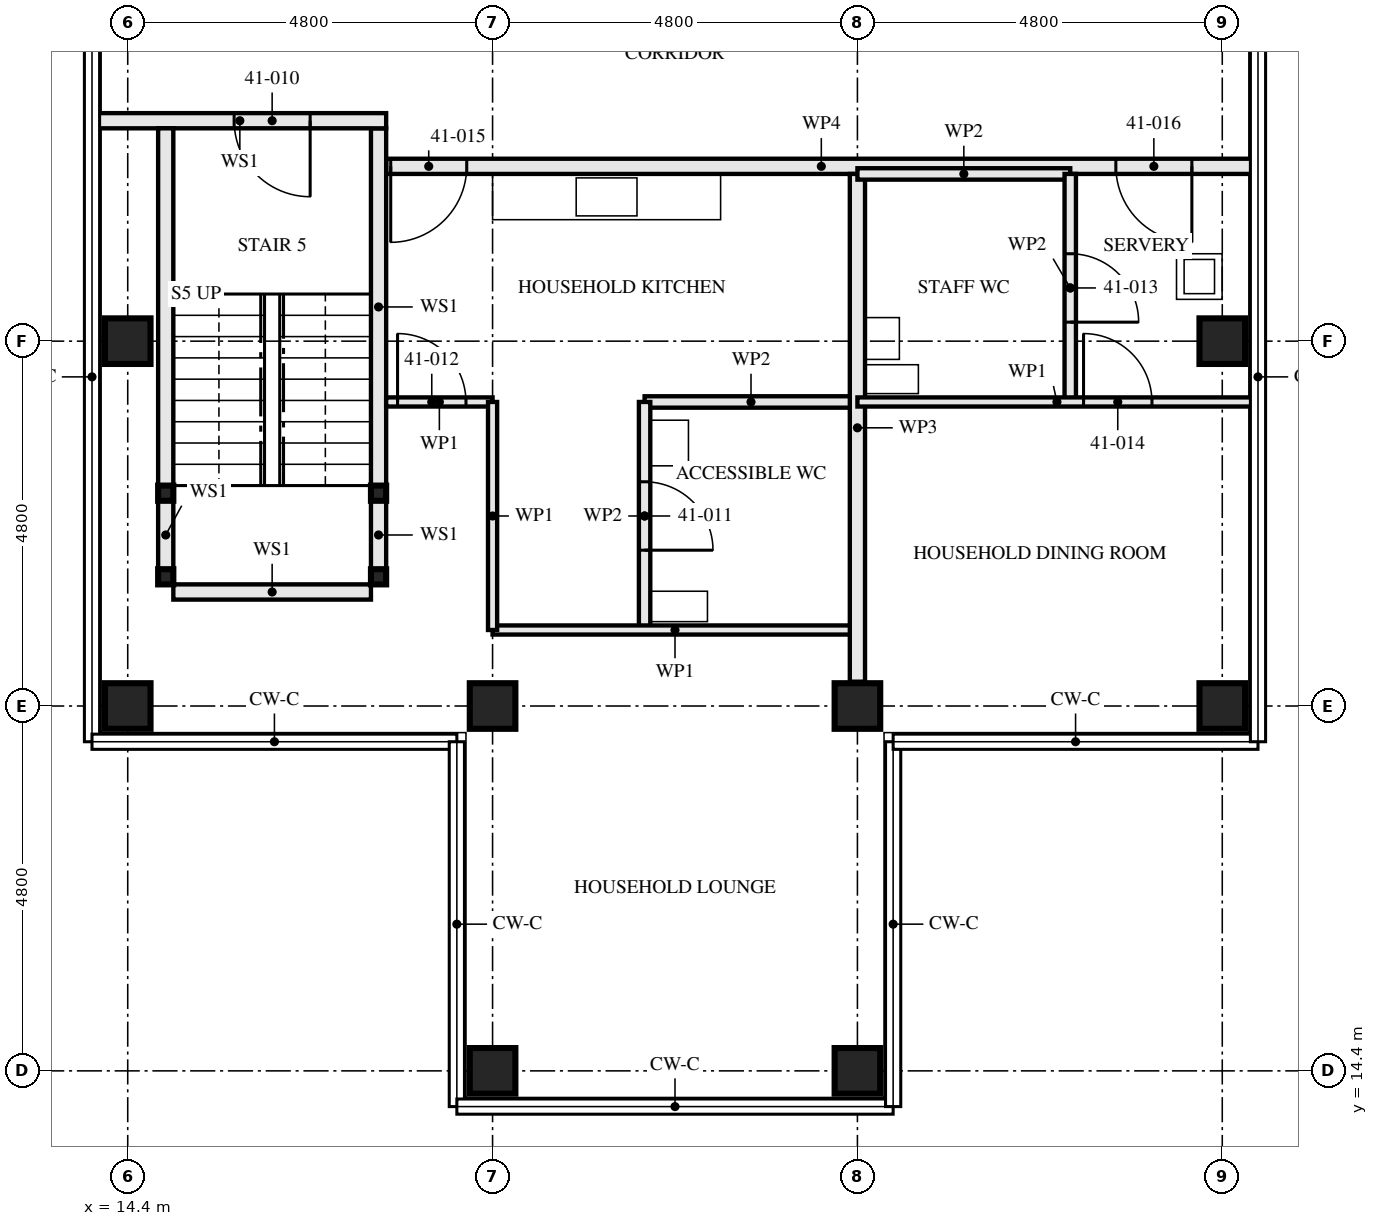
"""IFC4 building model, lengths in metres.
Left out: names, types, materials, properties, quantities, classifications, styles, units other than length and angle.
Written with IfcOpenShell. Run it as: python <this file> out.ifc"""

import sys

from ifc_helpers import new_model, si_unit, direction, frame, frame_2d, origin, origin_2d, place, context, subcontext, project, spatial, rectangle, hollow_rectangle, extrude, element, fill, save


model = new_model("IFC4")
c1 = context("Model", 3, precision=1e-05, world=origin(), true_north=direction((0.0, 1.0)))
c2 = subcontext(c1, "Body", "Model", "MODEL_VIEW")
j1 = project(units=[si_unit("LENGTHUNIT", "METRE"), si_unit("PLANEANGLEUNIT", "RADIAN")], contexts=[c1])
p1 = place(None, origin())
s1 = spatial("IfcSite", under=j1, at=p1, CompositionType="ELEMENT")
p2 = place(p1, origin())
s2 = spatial("IfcBuilding", under=s1, at=p2, CompositionType="ELEMENT")
p3 = place(p2, frame((0.0, 0.0, 151.5)))
s3 = spatial("IfcBuildingStorey", under=s2, at=p3, CompositionType="ELEMENT", Elevation=151.5)
p4 = place(p3, frame((14.4, 19.2, 0.0), z_axis=(0.0, 0.0, 1.0), x_axis=(0.0, 1.0, 0.0)))
e1 = element("IfcColumn", 1, at=p4, inside=s3, PredefinedType="COLUMN", context=c2, shape_type="SweptSolid", body=[
    extrude(hollow_rectangle(XDim=0.6, YDim=0.6, WallThickness=0.06, at=origin_2d()), origin(), (0.0, 0.0, 1.0), 3.5),
])
p5 = place(p3, frame((14.4, 24.0, 0.0), z_axis=(0.0, 0.0, 1.0), x_axis=(1.0, 0.0, 0.0)))
e2 = element("IfcColumn", 2, at=p5, inside=s3, PredefinedType="COLUMN", context=c2, shape_type="SweptSolid", body=[
    extrude(hollow_rectangle(XDim=0.6, YDim=0.6, WallThickness=0.08, at=origin_2d()), origin(), (0.0, 0.0, 1.0), 3.5),
])
for number, where, z_axis, x_axis in (
    (3, (19.2, 14.4, 0.0), (0.0, 0.0, 1.0), (0.0, 1.0, 0.0)),
    (4, (19.2, 19.2, 0.0), (0.0, 0.0, 1.0), (0.0, 1.0, 0.0)),
    (5, (24.0, 14.4, 0.0), (0.0, 0.0, 1.0), (0.0, 1.0, 0.0)),
    (6, (24.0, 19.2, 0.0), (0.0, 0.0, 1.0), (0.0, 1.0, 0.0)),
    (7, (28.8, 19.2, 0.0), (0.0, 0.0, 1.0), (0.0, 1.0, 0.0)),
):
    element("IfcColumn", number, at=place(p3, frame(where, z_axis=z_axis, x_axis=x_axis)), inside=s3, PredefinedType="COLUMN", context=c2, shape_type="SweptSolid", body=[
        extrude(hollow_rectangle(XDim=0.6, YDim=0.6, WallThickness=0.06, at=origin_2d()), origin(), (0.0, 0.0, 1.0), 3.5),
    ])
p6 = place(p3, frame((28.8, 24.0, 0.0), z_axis=(0.0, 0.0, 1.0), x_axis=(1.0, 0.0, 0.0)))
e8 = element("IfcColumn", 8, at=p6, inside=s3, PredefinedType="COLUMN", context=c2, shape_type="SweptSolid", body=[
    extrude(hollow_rectangle(XDim=0.6, YDim=0.6, WallThickness=0.08, at=origin_2d()), origin(), (0.0, 0.0, 1.0), 3.5),
])
for number, where, z_axis, x_axis in (
    (9, (14.9, 20.9, 0.0), (0.0, 0.0, 1.0), (1.0, 0.0, 0.0)),
    (10, (17.7, 20.9, 0.0), (0.0, 0.0, 1.0), (1.0, 0.0, 0.0)),
    (11, (14.9, 22.0, 0.0), (0.0, 0.0, 1.0), (1.0, 0.0, 0.0)),
    (12, (17.7, 22.0, 0.0), (0.0, 0.0, 1.0), (1.0, 0.0, 0.0)),
):
    element("IfcColumn", number, at=place(p3, frame(where, z_axis=z_axis, x_axis=x_axis)), inside=s3, PredefinedType="COLUMN", context=c2, shape_type="SweptSolid", body=[
        extrude(hollow_rectangle(XDim=0.2, YDim=0.2, WallThickness=0.008, at=origin_2d()), origin(), (0.0, 0.0, 1.0), 3.33),
    ])
p7 = place(p3, frame((14.9, 21.0, 0.0), z_axis=(0.0, 0.0, 1.0), x_axis=(0.0, 1.0, 0.0)))
e13 = element("IfcWall", 13, at=p7, inside=s3, PredefinedType="SOLIDWALL", context=c2, shape_type="SweptSolid", body=[
    extrude(rectangle(XDim=0.9, YDim=0.2, at=frame_2d((0.45, 0.0))), origin(), (0.0, 0.0, 1.0), 2.99),
])
p8 = place(p3, frame((14.9, 22.1, 0.0), z_axis=(0.0, 0.0, 1.0), x_axis=(0.0, 1.0, 0.0)))
e14 = element("IfcWall", 14, at=p8, inside=s3, PredefinedType="SOLIDWALL", context=c2, shape_type="SweptSolid", body=[
    extrude(rectangle(XDim=4.7, YDim=0.2, at=frame_2d((2.35, 0.0))), origin(), (0.0, 0.0, 1.0), 2.99),
])
p9 = place(p3, frame((17.7, 21.0, 0.0), z_axis=(0.0, 0.0, 1.0), x_axis=(0.0, 1.0, 0.0)))
e15 = element("IfcWall", 15, at=p9, inside=s3, PredefinedType="SOLIDWALL", context=c2, shape_type="SweptSolid", body=[
    extrude(rectangle(XDim=0.9, YDim=0.2, at=frame_2d((0.45, 0.0))), origin(), (0.0, 0.0, 1.0), 2.99),
])
p10 = place(p3, frame((17.7, 22.1, 0.0), z_axis=(0.0, 0.0, 1.0), x_axis=(0.0, 1.0, 0.0)))
e16 = element("IfcWall", 16, at=p10, inside=s3, PredefinedType="SOLIDWALL", context=c2, shape_type="SweptSolid", body=[
    extrude(rectangle(XDim=4.7, YDim=0.2, at=frame_2d((2.35, 0.0))), origin(), (0.0, 0.0, 1.0), 2.99),
])
p11 = place(p3, frame((15.0, 20.7, 0.0), z_axis=(0.0, 0.0, 1.0), x_axis=(1.0, 0.0, 0.0)))
e17 = element("IfcWall", 17, at=p11, inside=s3, PredefinedType="SOLIDWALL", context=c2, shape_type="SweptSolid", body=[
    extrude(rectangle(XDim=2.6, YDim=0.2, at=frame_2d((1.3, 0.0))), origin(), (0.0, 0.0, 1.0), 3.33),
])
p12 = place(p3, frame((13.95, 26.9, 0.0), z_axis=(0.0, 0.0, 1.0), x_axis=(1.0, 0.0, 0.0)))
e18 = element("IfcWall", 18, at=p12, inside=s3, PredefinedType="SOLIDWALL", context=c2, shape_type="SweptSolid", body=[
    extrude(rectangle(XDim=3.85, YDim=0.2, at=frame_2d((1.925, 0.0))), origin(), (0.0, 0.0, 1.0), 2.32),
])
p13 = place(p12, frame((1.85, 0.0, 0.0)))
e19 = element("IfcOpeningElement", 19, at=p13, cuts=e18, PredefinedType="OPENING", context=c2, shape_type="SweptSolid", body=[
    extrude(rectangle(XDim=1.0, YDim=2.1, at=frame_2d((0.5, 1.05))), frame((0.0, 0.111, 0.0), z_axis=(0.0, -1.0, 0.0), x_axis=(1.0, 0.0, 0.0)), (0.0, 0.0, 1.0), 0.221),
])
p14 = place(p3, frame((21.2, 20.2, 0.0), z_axis=(0.0, 0.0, 1.0), x_axis=(0.0, 1.0, 0.0)))
e20 = element("IfcWall", 20, at=p14, inside=s3, PredefinedType="PARTITIONING", context=c2, shape_type="SweptSolid", body=[
    extrude(rectangle(XDim=3.0, YDim=0.15, at=frame_2d((1.5, 0.0))), origin(), (0.0, 0.0, 1.0), 3.33),
])
p15 = place(p14, frame((1.05, 0.0, 0.0)))
e21 = element("IfcOpeningElement", 21, at=p15, cuts=e20, PredefinedType="OPENING", context=c2, shape_type="SweptSolid", body=[
    extrude(rectangle(XDim=0.9, YDim=2.1, at=frame_2d((0.45, 1.05))), frame((0.0, 0.085, 0.0), z_axis=(0.0, -1.0, 0.0), x_axis=(1.0, 0.0, 0.0)), (0.0, 0.0, 1.0), 0.171),
])
p16 = place(p3, frame((21.2, 23.2, 0.0), z_axis=(0.0, 0.0, 1.0), x_axis=(1.0, 0.0, 0.0)))
e22 = element("IfcWall", 22, at=p16, inside=s3, PredefinedType="PARTITIONING", context=c2, shape_type="SweptSolid", body=[
    extrude(rectangle(XDim=2.8, YDim=0.15, at=frame_2d((1.4, 0.0))), origin(), (0.0, 0.0, 1.0), 3.33),
])
p17 = place(p3, frame((17.8, 23.2, 0.0), z_axis=(0.0, 0.0, 1.0), x_axis=(1.0, 0.0, 0.0)))
e23 = element("IfcWall", 23, at=p17, inside=s3, PredefinedType="PARTITIONING", context=c2, shape_type="SweptSolid", body=[
    extrude(rectangle(XDim=1.4, YDim=0.12, at=frame_2d((0.7, 0.0))), origin(), (0.0, 0.0, 1.0), 3.33),
])
p18 = place(p17, frame((0.15, 0.0, 0.0)))
e24 = element("IfcOpeningElement", 24, at=p18, cuts=e23, PredefinedType="OPENING", context=c2, shape_type="SweptSolid", body=[
    extrude(rectangle(XDim=0.9, YDim=2.1, at=frame_2d((0.45, 1.05))), frame((0.0, 0.071, 0.0), z_axis=(0.0, -1.0, 0.0), x_axis=(1.0, 0.0, 0.0)), (0.0, 0.0, 1.0), 0.141),
])
p19 = place(p3, frame((19.2, 20.2, 0.0), z_axis=(0.0, 0.0, 1.0), x_axis=(1.0, 0.0, 0.0)))
e25 = element("IfcWall", 25, at=p19, inside=s3, PredefinedType="PARTITIONING", context=c2, shape_type="SweptSolid", body=[
    extrude(rectangle(XDim=4.8, YDim=0.12, at=frame_2d((2.4, 0.0))), origin(), (0.0, 0.0, 1.0), 3.33),
])
p20 = place(p3, frame((19.2, 20.2, 0.0), z_axis=(0.0, 0.0, 1.0), x_axis=(0.0, 1.0, 0.0)))
e26 = element("IfcWall", 26, at=p20, inside=s3, PredefinedType="PARTITIONING", context=c2, shape_type="SweptSolid", body=[
    extrude(rectangle(XDim=3.0, YDim=0.12, at=frame_2d((1.5, 0.0))), origin(), (0.0, 0.0, 1.0), 2.55),
])
p21 = place(p3, frame((24.0, 19.52, 0.0), z_axis=(0.0, 0.0, 1.0), x_axis=(0.0, 1.0, 0.0)))
e27 = element("IfcWall", 27, at=p21, inside=s3, PredefinedType="PARTITIONING", context=c2, shape_type="SweptSolid", body=[
    extrude(rectangle(XDim=6.68, YDim=0.2, at=frame_2d((3.34, 0.0))), origin(), (0.0, 0.0, 1.0), 2.55),
])
p22 = place(p3, frame((26.8, 23.2, 0.0), z_axis=(0.0, 0.0, 1.0), x_axis=(0.0, 1.0, 0.0)))
e28 = element("IfcWall", 28, at=p22, inside=s3, PredefinedType="PARTITIONING", context=c2, shape_type="SweptSolid", body=[
    extrude(rectangle(XDim=3.0, YDim=0.15, at=frame_2d((1.5, 0.0))), origin(), (0.0, 0.0, 1.0), 2.55),
])
p23 = place(p22, frame((1.05, 0.0, 0.0)))
e29 = element("IfcOpeningElement", 29, at=p23, cuts=e28, PredefinedType="OPENING", context=c2, shape_type="SweptSolid", body=[
    extrude(rectangle(XDim=0.9, YDim=2.1, at=frame_2d((0.45, 1.05))), frame((0.0, 0.085, 0.0), z_axis=(0.0, -1.0, 0.0), x_axis=(1.0, 0.0, 0.0)), (0.0, 0.0, 1.0), 0.171),
])
p24 = place(p3, frame((24.0, 26.2, 0.0), z_axis=(0.0, 0.0, 1.0), x_axis=(1.0, 0.0, 0.0)))
e30 = element("IfcWall", 30, at=p24, inside=s3, PredefinedType="PARTITIONING", context=c2, shape_type="SweptSolid", body=[
    extrude(rectangle(XDim=2.8, YDim=0.15, at=frame_2d((1.4, 0.0))), origin(), (0.0, 0.0, 1.0), 3.33),
])
p25 = place(p3, frame((24.0, 23.2, 0.0), z_axis=(0.0, 0.0, 1.0), x_axis=(1.0, 0.0, 0.0)))
e31 = element("IfcWall", 31, at=p25, inside=s3, PredefinedType="PARTITIONING", context=c2, shape_type="SweptSolid", body=[
    extrude(rectangle(XDim=5.25, YDim=0.12, at=frame_2d((2.625, 0.0))), origin(), (0.0, 0.0, 1.0), 2.32),
])
p26 = place(p25, frame((2.975, 0.0, 0.0)))
e32 = element("IfcOpeningElement", 32, at=p26, cuts=e31, PredefinedType="OPENING", context=c2, shape_type="SweptSolid", body=[
    extrude(rectangle(XDim=0.9, YDim=2.1, at=frame_2d((0.45, 1.05))), frame((0.0, 0.071, 0.0), z_axis=(0.0, -1.0, 0.0), x_axis=(1.0, 0.0, 0.0)), (0.0, 0.0, 1.0), 0.141),
])
p27 = place(p3, frame((17.8, 26.3, 0.0), z_axis=(0.0, 0.0, 1.0), x_axis=(1.0, 0.0, 0.0)))
e33 = element("IfcWall", 33, at=p27, inside=s3, PredefinedType="PARTITIONING", context=c2, shape_type="SweptSolid", body=[
    extrude(rectangle(XDim=11.45, YDim=0.2, at=frame_2d((5.725, 0.0))), origin(), (0.0, 0.0, 1.0), 2.32),
])
p28 = place(p27, frame((0.06, 0.0, 0.0)))
e34 = element("IfcOpeningElement", 34, at=p28, cuts=e33, PredefinedType="OPENING", context=c2, shape_type="SweptSolid", body=[
    extrude(rectangle(XDim=1.0, YDim=2.1, at=frame_2d((0.5, 1.05))), frame((0.0, 0.111, 0.0), z_axis=(0.0, -1.0, 0.0), x_axis=(1.0, 0.0, 0.0)), (0.0, 0.0, 1.0), 0.221),
])
p29 = place(p27, frame((9.6, 0.0, 0.0)))
e35 = element("IfcOpeningElement", 35, at=p29, cuts=e33, PredefinedType="OPENING", context=c2, shape_type="SweptSolid", body=[
    extrude(rectangle(XDim=1.0, YDim=2.1, at=frame_2d((0.5, 1.05))), frame((0.0, 0.111, 0.0), z_axis=(0.0, -1.0, 0.0), x_axis=(1.0, 0.0, 0.0)), (0.0, 0.0, 1.0), 0.221),
])
p30 = place(p13, frame((1.0, 0.0, 0.0), z_axis=(0.0, 0.0, 1.0), x_axis=(-1.0, 0.0, 0.0)))
e36 = element("IfcDoor", 36, at=p30, inside=s3, OperationType="SINGLE_SWING_RIGHT", PredefinedType="DOOR", context=c2, shape_type="SweptSolid", body=[
    extrude(rectangle(XDim=1.0, YDim=2.1, at=frame_2d((0.5, 1.05))), frame((0.0, 0.032, 0.0), z_axis=(0.0, -1.0, 0.0), x_axis=(1.0, 0.0, 0.0)), (0.0, 0.0, 1.0), 0.064),
])
fill(e19, e36)
p31 = place(p15, frame((0.9, 0.0, 0.0), z_axis=(0.0, 0.0, 1.0), x_axis=(-1.0, 0.0, 0.0)))
e37 = element("IfcDoor", 37, at=p31, inside=s3, OperationType="SINGLE_SWING_LEFT", PredefinedType="DOOR", context=c2, shape_type="SweptSolid", body=[
    extrude(rectangle(XDim=0.9, YDim=2.1, at=frame_2d((0.45, 1.05))), frame((0.0, 0.022, 0.0), z_axis=(0.0, -1.0, 0.0), x_axis=(1.0, 0.0, 0.0)), (0.0, 0.0, 1.0), 0.044),
])
fill(e21, e37)
p32 = place(p18, origin())
e38 = element("IfcDoor", 38, at=p32, inside=s3, OperationType="SINGLE_SWING_RIGHT", PredefinedType="DOOR", context=c2, shape_type="SweptSolid", body=[
    extrude(rectangle(XDim=0.9, YDim=2.1, at=frame_2d((0.45, 1.05))), frame((0.0, 0.022, 0.0), z_axis=(0.0, -1.0, 0.0), x_axis=(1.0, 0.0, 0.0)), (0.0, 0.0, 1.0), 0.044),
])
fill(e24, e38)
p33 = place(p23, frame((0.9, 0.0, 0.0), z_axis=(0.0, 0.0, 1.0), x_axis=(-1.0, 0.0, 0.0)))
e39 = element("IfcDoor", 39, at=p33, inside=s3, OperationType="SINGLE_SWING_LEFT", PredefinedType="DOOR", context=c2, shape_type="SweptSolid", body=[
    extrude(rectangle(XDim=0.9, YDim=2.1, at=frame_2d((0.45, 1.05))), frame((0.0, 0.022, 0.0), z_axis=(0.0, -1.0, 0.0), x_axis=(1.0, 0.0, 0.0)), (0.0, 0.0, 1.0), 0.044),
])
fill(e29, e39)
p34 = place(p26, origin())
e40 = element("IfcDoor", 40, at=p34, inside=s3, OperationType="SINGLE_SWING_RIGHT", PredefinedType="DOOR", context=c2, shape_type="SweptSolid", body=[
    extrude(rectangle(XDim=0.9, YDim=2.1, at=frame_2d((0.45, 1.05))), frame((0.0, 0.022, 0.0), z_axis=(0.0, -1.0, 0.0), x_axis=(1.0, 0.0, 0.0)), (0.0, 0.0, 1.0), 0.044),
])
fill(e32, e40)
p35 = place(p28, frame((1.0, 0.0, 0.0), z_axis=(0.0, 0.0, 1.0), x_axis=(-1.0, 0.0, 0.0)))
e41 = element("IfcDoor", 41, at=p35, inside=s3, OperationType="SINGLE_SWING_LEFT", PredefinedType="DOOR", context=c2, shape_type="SweptSolid", body=[
    extrude(rectangle(XDim=1.0, YDim=2.1, at=frame_2d((0.5, 1.05))), frame((0.0, 0.027, 0.0), z_axis=(0.0, -1.0, 0.0), x_axis=(1.0, 0.0, 0.0)), (0.0, 0.0, 1.0), 0.054),
])
fill(e34, e41)
p36 = place(p29, frame((1.0, 0.0, 0.0), z_axis=(0.0, 0.0, 1.0), x_axis=(-1.0, 0.0, 0.0)))
e42 = element("IfcDoor", 42, at=p36, inside=s3, OperationType="SINGLE_SWING_RIGHT", PredefinedType="DOOR", context=c2, shape_type="SweptSolid", body=[
    extrude(rectangle(XDim=1.0, YDim=2.1, at=frame_2d((0.5, 1.05))), frame((0.0, 0.027, 0.0), z_axis=(0.0, -1.0, 0.0), x_axis=(1.0, 0.0, 0.0)), (0.0, 0.0, 1.0), 0.054),
])
fill(e35, e42)
save(model, sys.argv[1])
